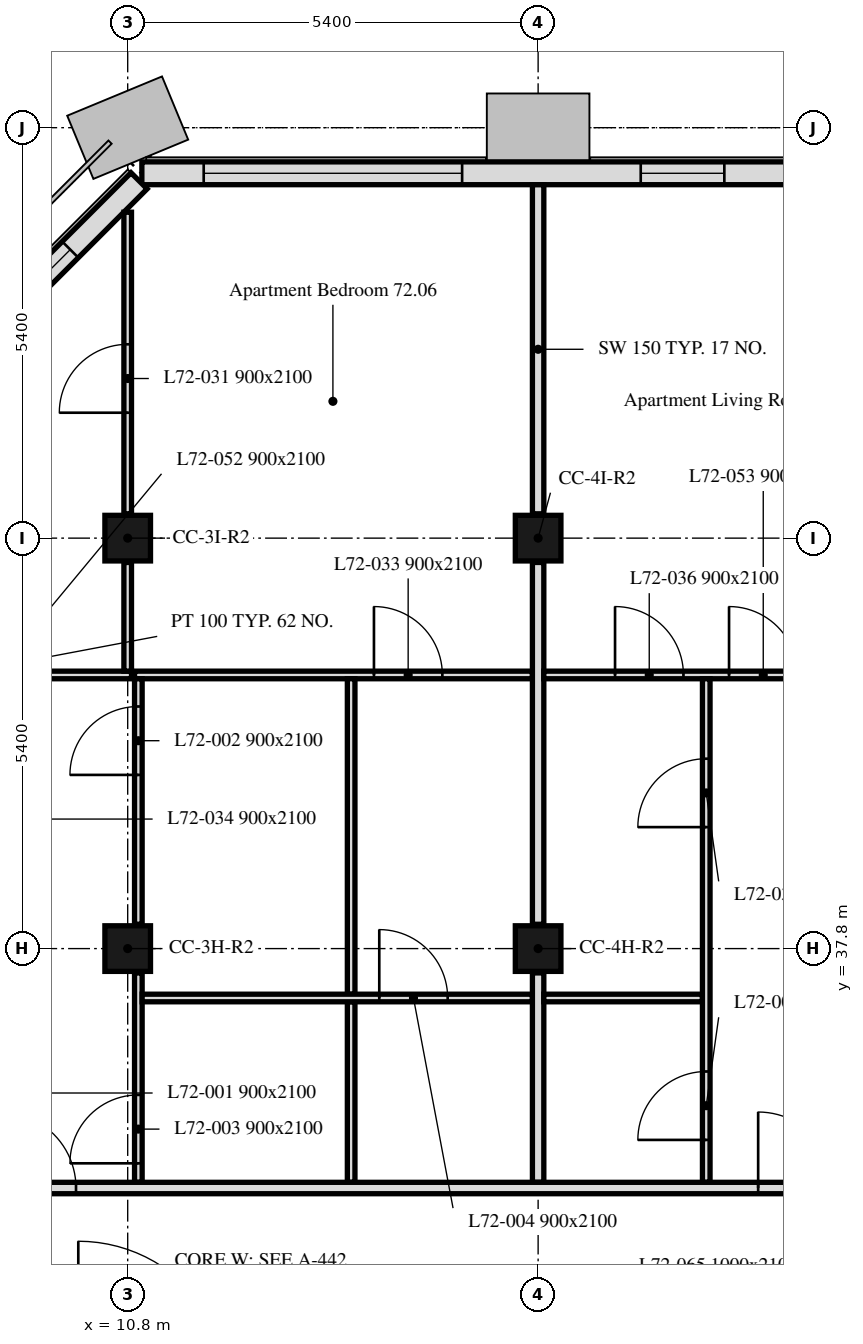
"""IFC4 building model, lengths in metres.
Left out: names, types, materials, properties, quantities, classifications, styles, units other than length and angle.
Written with IfcOpenShell. Run it as: python <this file> out.ifc"""

import sys

from ifc_helpers import new_model, si_unit, direction, frame, frame_2d, origin, origin_2d, place, context, subcontext, project, spatial, rectangle, extrude, element, fill, save


model = new_model("IFC4")
c1 = context("Model", 3, precision=1e-05, world=origin(), true_north=direction((0.0, 1.0)))
c2 = subcontext(c1, "Body", "Model", "MODEL_VIEW")
j1 = project(units=[si_unit("LENGTHUNIT", "METRE"), si_unit("PLANEANGLEUNIT", "RADIAN")], contexts=[c1])
p1 = place(None, origin())
s1 = spatial("IfcSite", under=j1, at=p1, CompositionType="ELEMENT")
p2 = place(p1, origin())
s2 = spatial("IfcBuilding", under=s1, at=p2, CompositionType="ELEMENT")
p3 = place(p2, frame((0.0, 0.0, 291.7)))
s3 = spatial("IfcBuildingStorey", under=s2, at=p3, CompositionType="ELEMENT", Elevation=291.7)
for number, where, z_axis, x_axis in (
    (1, (10.8, 37.8, 0.0), (0.0, 0.0, 1.0), (1.0, 0.0, 0.0)),
    (2, (16.2, 37.8, 0.0), (0.0, 0.0, 1.0), (1.0, 0.0, 0.0)),
    (3, (10.8, 43.2, 0.0), (0.0, 0.0, 1.0), (1.0, 0.0, 0.0)),
    (4, (16.2, 43.2, 0.0), (0.0, 0.0, 1.0), (1.0, 0.0, 0.0)),
):
    element("IfcColumn", number, at=place(p3, frame(where, z_axis=z_axis, x_axis=x_axis)), inside=s3, PredefinedType="COLUMN", context=c2, shape_type="SweptSolid", body=[
        extrude(rectangle(XDim=0.6, YDim=0.6, at=origin_2d()), origin(), (0.0, 0.0, 1.0), 3.0),
    ])
p4 = place(p3, frame((43.014, 48.0, 0.0), z_axis=(0.0, 0.0, 1.0), x_axis=(-1.0, 0.0, 0.0)))
e5 = element("IfcWall", 5, at=p4, inside=s3, PredefinedType="SOLIDWALL", context=c2, shape_type="SweptSolid", body=[
    extrude(rectangle(XDim=32.027, YDim=0.3, at=frame_2d((16.014, 0.0))), origin(), (0.0, 0.0, 1.0), 3.0),
])
p5 = place(p4, frame((2.764, 0.0, 0.9)))
e6 = element("IfcOpeningElement", 6, at=p5, cuts=e5, PredefinedType="OPENING", context=c2, shape_type="SweptSolid", body=[
    extrude(rectangle(XDim=1.1, YDim=1.7, at=frame_2d((0.55, 0.85))), frame((0.0, 0.16, 0.0), z_axis=(0.0, -1.0, 0.0), x_axis=(1.0, 0.0, 0.0)), (0.0, 0.0, 1.0), 0.32),
])
p6 = place(p4, frame((6.214, 0.0, 0.9)))
e7 = element("IfcOpeningElement", 7, at=p6, cuts=e5, PredefinedType="OPENING", context=c2, shape_type="SweptSolid", body=[
    extrude(rectangle(XDim=3.4, YDim=1.7, at=frame_2d((1.7, 0.85))), frame((0.0, 0.16, 0.0), z_axis=(0.0, -1.0, 0.0), x_axis=(1.0, 0.0, 0.0)), (0.0, 0.0, 1.0), 0.32),
])
p7 = place(p4, frame((13.564, 0.0, 0.9)))
e8 = element("IfcOpeningElement", 8, at=p7, cuts=e5, PredefinedType="OPENING", context=c2, shape_type="SweptSolid", body=[
    extrude(rectangle(XDim=1.1, YDim=1.7, at=frame_2d((0.55, 0.85))), frame((0.0, 0.16, 0.0), z_axis=(0.0, -1.0, 0.0), x_axis=(1.0, 0.0, 0.0)), (0.0, 0.0, 1.0), 0.32),
])
p8 = place(p4, frame((17.014, 0.0, 0.9)))
e9 = element("IfcOpeningElement", 9, at=p8, cuts=e5, PredefinedType="OPENING", context=c2, shape_type="SweptSolid", body=[
    extrude(rectangle(XDim=3.4, YDim=1.7, at=frame_2d((1.7, 0.85))), frame((0.0, 0.16, 0.0), z_axis=(0.0, -1.0, 0.0), x_axis=(1.0, 0.0, 0.0)), (0.0, 0.0, 1.0), 0.32),
])
p9 = place(p4, frame((24.364, 0.0, 0.9)))
e10 = element("IfcOpeningElement", 10, at=p9, cuts=e5, PredefinedType="OPENING", context=c2, shape_type="SweptSolid", body=[
    extrude(rectangle(XDim=1.1, YDim=1.7, at=frame_2d((0.55, 0.85))), frame((0.0, 0.16, 0.0), z_axis=(0.0, -1.0, 0.0), x_axis=(1.0, 0.0, 0.0)), (0.0, 0.0, 1.0), 0.32),
])
p10 = place(p4, frame((27.814, 0.0, 0.9)))
e11 = element("IfcOpeningElement", 11, at=p10, cuts=e5, PredefinedType="OPENING", context=c2, shape_type="SweptSolid", body=[
    extrude(rectangle(XDim=3.4, YDim=1.7, at=frame_2d((1.7, 0.85))), frame((0.0, 0.16, 0.0), z_axis=(0.0, -1.0, 0.0), x_axis=(1.0, 0.0, 0.0)), (0.0, 0.0, 1.0), 0.32),
])
p11 = place(p3, frame((10.949, 47.901, 0.0), z_axis=(0.0, 0.0, 1.0), x_axis=(-0.707106781187, -0.707106781187, 0.0)))
e12 = element("IfcWall", 12, at=p11, inside=s3, PredefinedType="SOLIDWALL", context=c2, shape_type="SweptSolid", body=[
    extrude(rectangle(XDim=6.86, YDim=0.3, at=frame_2d((3.43, 0.0))), origin(), (0.0, 0.0, 1.0), 3.0),
])
p12 = place(p11, frame((1.28, 0.0, 0.9)))
e13 = element("IfcOpeningElement", 13, at=p12, cuts=e12, PredefinedType="OPENING", context=c2, shape_type="SweptSolid", body=[
    extrude(rectangle(XDim=1.1, YDim=1.7, at=frame_2d((0.55, 0.85))), frame((0.0, 0.16, 0.0), z_axis=(0.0, -1.0, 0.0), x_axis=(1.0, 0.0, 0.0)), (0.0, 0.0, 1.0), 0.32),
])
p13 = place(p11, frame((4.48, 0.0, 0.9)))
e14 = element("IfcOpeningElement", 14, at=p13, cuts=e12, PredefinedType="OPENING", context=c2, shape_type="SweptSolid", body=[
    extrude(rectangle(XDim=1.1, YDim=1.7, at=frame_2d((0.55, 0.85))), frame((0.0, 0.16, 0.0), z_axis=(0.0, -1.0, 0.0), x_axis=(1.0, 0.0, 0.0)), (0.0, 0.0, 1.0), 0.32),
])
p14 = place(p3, frame((6.151, 41.4, 0.0), z_axis=(0.0, 0.0, 1.0), x_axis=(1.0, 0.0, 0.0)))
e15 = element("IfcWall", 15, at=p14, inside=s3, PredefinedType="PARTITIONING", context=c2, shape_type="SweptSolid", body=[
    extrude(rectangle(XDim=4.699, YDim=0.1, at=frame_2d((2.35, 0.0))), origin(), (0.0, 0.0, 1.0), 3.0),
])
p15 = place(p14, frame((1.079, 0.0, 0.0)))
e16 = element("IfcOpeningElement", 16, at=p15, cuts=e15, PredefinedType="OPENING", context=c2, shape_type="SweptSolid", body=[
    extrude(rectangle(XDim=0.9, YDim=2.1, at=frame_2d((0.45, 1.05))), frame((0.0, 0.05, 0.0), z_axis=(0.0, -1.0, 0.0), x_axis=(1.0, 0.0, 0.0)), (0.0, 0.0, 1.0), 0.1),
])
p16 = place(p14, frame((2.449, 0.0, 0.0)))
e17 = element("IfcOpeningElement", 17, at=p16, cuts=e15, PredefinedType="OPENING", context=c2, shape_type="SweptSolid", body=[
    extrude(rectangle(XDim=0.9, YDim=2.1, at=frame_2d((0.45, 1.05))), frame((0.0, 0.05, 0.0), z_axis=(0.0, -1.0, 0.0), x_axis=(1.0, 0.0, 0.0)), (0.0, 0.0, 1.0), 0.1),
])
p17 = place(p3, frame((10.8, 41.45, 0.0), z_axis=(0.0, 0.0, 1.0), x_axis=(0.0, 1.0, 0.0)))
e18 = element("IfcWall", 18, at=p17, inside=s3, PredefinedType="PARTITIONING", context=c2, shape_type="SweptSolid", body=[
    extrude(rectangle(XDim=1.43, YDim=0.1, at=frame_2d((0.715, 0.0))), origin(), (0.0, 0.0, 1.0), 3.0),
])
p18 = place(p3, frame((10.8, 43.52, 0.0), z_axis=(0.0, 0.0, 1.0), x_axis=(0.0, 1.0, 0.0)))
e19 = element("IfcWall", 19, at=p18, inside=s3, PredefinedType="PARTITIONING", context=c2, shape_type="SweptSolid", body=[
    extrude(rectangle(XDim=3.968, YDim=0.1, at=frame_2d((1.984, 0.0))), origin(), (0.0, 0.0, 1.0), 3.0),
])
p19 = place(p18, frame((1.33, 0.0, 0.0)))
e20 = element("IfcOpeningElement", 20, at=p19, cuts=e19, PredefinedType="OPENING", context=c2, shape_type="SweptSolid", body=[
    extrude(rectangle(XDim=0.9, YDim=2.1, at=frame_2d((0.45, 1.05))), frame((0.0, 0.05, 0.0), z_axis=(0.0, -1.0, 0.0), x_axis=(1.0, 0.0, 0.0)), (0.0, 0.0, 1.0), 0.1),
])
p20 = place(p3, frame((10.89, 41.4, 0.0), z_axis=(0.0, 0.0, 1.0), x_axis=(1.0, 0.0, 0.0)))
e21 = element("IfcWall", 21, at=p20, inside=s3, PredefinedType="PARTITIONING", context=c2, shape_type="SweptSolid", body=[
    extrude(rectangle(XDim=5.235, YDim=0.1, at=frame_2d((2.618, 0.0))), origin(), (0.0, 0.0, 1.0), 3.0),
])
p21 = place(p20, frame((3.15, 0.0, 0.0)))
e22 = element("IfcOpeningElement", 22, at=p21, cuts=e21, PredefinedType="OPENING", context=c2, shape_type="SweptSolid", body=[
    extrude(rectangle(XDim=0.9, YDim=2.1, at=frame_2d((0.45, 1.05))), frame((0.0, 0.05, 0.0), z_axis=(0.0, -1.0, 0.0), x_axis=(1.0, 0.0, 0.0)), (0.0, 0.0, 1.0), 0.1),
])
p22 = place(p3, frame((16.2, 43.52, 0.0), z_axis=(0.0, 0.0, 1.0), x_axis=(0.0, 1.0, 0.0)))
e23 = element("IfcWall", 23, at=p22, inside=s3, PredefinedType="PARTITIONING", context=c2, shape_type="SweptSolid", body=[
    extrude(rectangle(XDim=4.329, YDim=0.15, at=frame_2d((2.165, 0.0))), origin(), (0.0, 0.0, 1.0), 2.4),
])
p23 = place(p3, frame((10.94, 34.725, 0.0), z_axis=(0.0, 0.0, 1.0), x_axis=(0.0, 1.0, 0.0)))
e24 = element("IfcWall", 24, at=p23, inside=s3, PredefinedType="PARTITIONING", context=c2, shape_type="SweptSolid", body=[
    extrude(rectangle(XDim=2.755, YDim=0.1, at=frame_2d((1.377, 0.0))), origin(), (0.0, 0.0, 1.0), 3.0),
])
p24 = place(p23, frame((0.25, 0.0, 0.0)))
e25 = element("IfcOpeningElement", 25, at=p24, cuts=e24, PredefinedType="OPENING", context=c2, shape_type="SweptSolid", body=[
    extrude(rectangle(XDim=0.9, YDim=2.1, at=frame_2d((0.45, 1.05))), frame((0.0, 0.05, 0.0), z_axis=(0.0, -1.0, 0.0), x_axis=(1.0, 0.0, 0.0)), (0.0, 0.0, 1.0), 0.1),
])
p25 = place(p3, frame((10.94, 38.12, 0.0), z_axis=(0.0, 0.0, 1.0), x_axis=(0.0, 1.0, 0.0)))
e26 = element("IfcWall", 26, at=p25, inside=s3, PredefinedType="PARTITIONING", context=c2, shape_type="SweptSolid", body=[
    extrude(rectangle(XDim=3.23, YDim=0.1, at=frame_2d((1.615, 0.0))), origin(), (0.0, 0.0, 1.0), 3.0),
])
p26 = place(p25, frame((1.965, 0.0, 0.0)))
e27 = element("IfcOpeningElement", 27, at=p26, cuts=e26, PredefinedType="OPENING", context=c2, shape_type="SweptSolid", body=[
    extrude(rectangle(XDim=0.9, YDim=2.1, at=frame_2d((0.45, 1.05))), frame((0.0, 0.05, 0.0), z_axis=(0.0, -1.0, 0.0), x_axis=(1.0, 0.0, 0.0)), (0.0, 0.0, 1.0), 0.1),
])
p27 = place(p3, frame((13.74, 37.2, 0.0), z_axis=(0.0, 0.0, 1.0), x_axis=(0.0, 1.0, 0.0)))
e28 = element("IfcWall", 28, at=p27, inside=s3, PredefinedType="PARTITIONING", context=c2, shape_type="SweptSolid", body=[
    extrude(rectangle(XDim=4.15, YDim=0.1, at=frame_2d((2.075, 0.0))), origin(), (0.0, 0.0, 1.0), 3.0),
])
p28 = place(p3, frame((13.74, 34.725, 0.0), z_axis=(0.0, 0.0, 1.0), x_axis=(0.0, 1.0, 0.0)))
e29 = element("IfcWall", 29, at=p28, inside=s3, PredefinedType="PARTITIONING", context=c2, shape_type="SweptSolid", body=[
    extrude(rectangle(XDim=2.375, YDim=0.1, at=frame_2d((1.188, 0.0))), origin(), (0.0, 0.0, 1.0), 3.0),
])
p29 = place(p3, frame((10.99, 37.15, 0.0), z_axis=(0.0, 0.0, 1.0), x_axis=(1.0, 0.0, 0.0)))
e30 = element("IfcWall", 30, at=p29, inside=s3, PredefinedType="PARTITIONING", context=c2, shape_type="SweptSolid", body=[
    extrude(rectangle(XDim=5.135, YDim=0.1, at=frame_2d((2.567, 0.0))), origin(), (0.0, 0.0, 1.0), 3.0),
])
p30 = place(p29, frame((3.12, 0.0, 0.0)))
e31 = element("IfcOpeningElement", 31, at=p30, cuts=e30, PredefinedType="OPENING", context=c2, shape_type="SweptSolid", body=[
    extrude(rectangle(XDim=0.9, YDim=2.1, at=frame_2d((0.45, 1.05))), frame((0.0, 0.05, 0.0), z_axis=(0.0, -1.0, 0.0), x_axis=(1.0, 0.0, 0.0)), (0.0, 0.0, 1.0), 0.1),
])
p31 = place(p3, frame((16.2, 38.12, 0.0), z_axis=(0.0, 0.0, 1.0), x_axis=(0.0, 1.0, 0.0)))
e32 = element("IfcWall", 32, at=p31, inside=s3, PredefinedType="PARTITIONING", context=c2, shape_type="SweptSolid", body=[
    extrude(rectangle(XDim=4.76, YDim=0.15, at=frame_2d((2.38, 0.0))), origin(), (0.0, 0.0, 1.0), 2.4),
])
p32 = place(p3, frame((16.2, 34.725, 0.0), z_axis=(0.0, 0.0, 1.0), x_axis=(0.0, 1.0, 0.0)))
e33 = element("IfcWall", 33, at=p32, inside=s3, PredefinedType="PARTITIONING", context=c2, shape_type="SweptSolid", body=[
    extrude(rectangle(XDim=2.755, YDim=0.15, at=frame_2d((1.377, 0.0))), origin(), (0.0, 0.0, 1.0), 2.4),
])
p33 = place(p3, frame((16.275, 41.4, 0.0), z_axis=(0.0, 0.0, 1.0), x_axis=(1.0, 0.0, 0.0)))
e34 = element("IfcWall", 34, at=p33, inside=s3, PredefinedType="PARTITIONING", context=c2, shape_type="SweptSolid", body=[
    extrude(rectangle(XDim=10.65, YDim=0.1, at=frame_2d((5.325, 0.0))), origin(), (0.0, 0.0, 1.0), 2.4),
])
p34 = place(p33, frame((0.937, 0.0, 0.0)))
e35 = element("IfcOpeningElement", 35, at=p34, cuts=e34, PredefinedType="OPENING", context=c2, shape_type="SweptSolid", body=[
    extrude(rectangle(XDim=0.9, YDim=2.1, at=frame_2d((0.45, 1.05))), frame((0.0, 0.05, 0.0), z_axis=(0.0, -1.0, 0.0), x_axis=(1.0, 0.0, 0.0)), (0.0, 0.0, 1.0), 0.1),
])
p35 = place(p33, frame((8.075, 0.0, 0.0)))
e36 = element("IfcOpeningElement", 36, at=p35, cuts=e34, PredefinedType="OPENING", context=c2, shape_type="SweptSolid", body=[
    extrude(rectangle(XDim=0.9, YDim=2.1, at=frame_2d((0.45, 1.05))), frame((0.0, 0.05, 0.0), z_axis=(0.0, -1.0, 0.0), x_axis=(1.0, 0.0, 0.0)), (0.0, 0.0, 1.0), 0.1),
])
p36 = place(p33, frame((2.437, 0.0, 0.0)))
e37 = element("IfcOpeningElement", 37, at=p36, cuts=e34, PredefinedType="OPENING", context=c2, shape_type="SweptSolid", body=[
    extrude(rectangle(XDim=0.9, YDim=2.1, at=frame_2d((0.45, 1.05))), frame((0.0, 0.05, 0.0), z_axis=(0.0, -1.0, 0.0), x_axis=(1.0, 0.0, 0.0)), (0.0, 0.0, 1.0), 0.1),
])
p37 = place(p3, frame((16.275, 37.15, 0.0), z_axis=(0.0, 0.0, 1.0), x_axis=(1.0, 0.0, 0.0)))
e38 = element("IfcWall", 38, at=p37, inside=s3, PredefinedType="PARTITIONING", context=c2, shape_type="SweptSolid", body=[
    extrude(rectangle(XDim=2.087, YDim=0.1, at=frame_2d((1.043, 0.0))), origin(), (0.0, 0.0, 1.0), 3.0),
])
p38 = place(p3, frame((18.412, 34.725, 0.0), z_axis=(0.0, 0.0, 1.0), x_axis=(0.0, 1.0, 0.0)))
e39 = element("IfcWall", 39, at=p38, inside=s3, PredefinedType="PARTITIONING", context=c2, shape_type="SweptSolid", body=[
    extrude(rectangle(XDim=6.625, YDim=0.1, at=frame_2d((3.312, 0.0))), origin(), (0.0, 0.0, 1.0), 3.0),
])
p39 = place(p38, frame((0.558, 0.0, 0.0)))
e40 = element("IfcOpeningElement", 40, at=p39, cuts=e39, PredefinedType="OPENING", context=c2, shape_type="SweptSolid", body=[
    extrude(rectangle(XDim=0.9, YDim=2.1, at=frame_2d((0.45, 1.05))), frame((0.0, 0.05, 0.0), z_axis=(0.0, -1.0, 0.0), x_axis=(1.0, 0.0, 0.0)), (0.0, 0.0, 1.0), 0.1),
])
p40 = place(p38, frame((4.673, 0.0, 0.0)))
e41 = element("IfcOpeningElement", 41, at=p40, cuts=e39, PredefinedType="OPENING", context=c2, shape_type="SweptSolid", body=[
    extrude(rectangle(XDim=0.9, YDim=2.1, at=frame_2d((0.45, 1.05))), frame((0.0, 0.05, 0.0), z_axis=(0.0, -1.0, 0.0), x_axis=(1.0, 0.0, 0.0)), (0.0, 0.0, 1.0), 0.1),
])
p41 = place(p3, frame((6.151, 34.65, 0.0), z_axis=(0.0, 0.0, 1.0), x_axis=(1.0, 0.0, 0.0)))
e42 = element("IfcWall", 42, at=p41, inside=s3, PredefinedType="PARTITIONING", context=c2, shape_type="SweptSolid", body=[
    extrude(rectangle(XDim=41.698, YDim=0.15, at=frame_2d((20.849, 0.0))), origin(), (0.0, 0.0, 1.0), 2.4),
])
p42 = place(p41, frame((2.969, 0.0, 0.0)))
e43 = element("IfcOpeningElement", 43, at=p42, cuts=e42, PredefinedType="OPENING", context=c2, shape_type="SweptSolid", body=[
    extrude(rectangle(XDim=1.0, YDim=2.1, at=frame_2d((0.5, 1.05))), frame((0.0, 0.075, 0.0), z_axis=(0.0, -1.0, 0.0), x_axis=(1.0, 0.0, 0.0)), (0.0, 0.0, 1.0), 0.15),
])
p43 = place(p41, frame((12.944, 0.0, 0.0)))
e44 = element("IfcOpeningElement", 44, at=p43, cuts=e42, PredefinedType="OPENING", context=c2, shape_type="SweptSolid", body=[
    extrude(rectangle(XDim=1.0, YDim=2.1, at=frame_2d((0.5, 1.05))), frame((0.0, 0.075, 0.0), z_axis=(0.0, -1.0, 0.0), x_axis=(1.0, 0.0, 0.0)), (0.0, 0.0, 1.0), 0.15),
])
p44 = place(p41, frame((24.444, 0.0, 0.0)))
e45 = element("IfcOpeningElement", 45, at=p44, cuts=e42, PredefinedType="OPENING", context=c2, shape_type="SweptSolid", body=[
    extrude(rectangle(XDim=1.0, YDim=2.1, at=frame_2d((0.5, 1.05))), frame((0.0, 0.075, 0.0), z_axis=(0.0, -1.0, 0.0), x_axis=(1.0, 0.0, 0.0)), (0.0, 0.0, 1.0), 0.15),
])
p45 = place(p41, frame((34.964, 0.0, 0.0)))
e46 = element("IfcOpeningElement", 46, at=p45, cuts=e42, PredefinedType="OPENING", context=c2, shape_type="SweptSolid", body=[
    extrude(rectangle(XDim=1.0, YDim=2.1, at=frame_2d((0.5, 1.05))), frame((0.0, 0.075, 0.0), z_axis=(0.0, -1.0, 0.0), x_axis=(1.0, 0.0, 0.0)), (0.0, 0.0, 1.0), 0.15),
])
p46 = place(p9, origin())
e47 = element("IfcWindow", 47, at=p46, inside=s3, PartitioningType="SINGLE_PANEL", PredefinedType="WINDOW", context=c2, shape_type="SweptSolid", body=[
    extrude(rectangle(XDim=1.1, YDim=1.7, at=frame_2d((0.55, 0.85))), frame((0.0, 0.03, 0.0), z_axis=(0.0, -1.0, 0.0), x_axis=(1.0, 0.0, 0.0)), (0.0, 0.0, 1.0), 0.06),
])
fill(e10, e47)
p47 = place(p10, origin())
e48 = element("IfcWindow", 48, at=p47, inside=s3, PartitioningType="SINGLE_PANEL", PredefinedType="WINDOW", context=c2, shape_type="SweptSolid", body=[
    extrude(rectangle(XDim=3.4, YDim=1.7, at=frame_2d((1.7, 0.85))), frame((0.0, 0.03, 0.0), z_axis=(0.0, -1.0, 0.0), x_axis=(1.0, 0.0, 0.0)), (0.0, 0.0, 1.0), 0.06),
])
fill(e11, e48)
p48 = place(p12, origin())
e49 = element("IfcWindow", 49, at=p48, inside=s3, PartitioningType="SINGLE_PANEL", PredefinedType="WINDOW", context=c2, shape_type="SweptSolid", body=[
    extrude(rectangle(XDim=1.1, YDim=1.7, at=frame_2d((0.55, 0.85))), frame((0.0, 0.03, 0.0), z_axis=(0.0, -1.0, 0.0), x_axis=(1.0, 0.0, 0.0)), (0.0, 0.0, 1.0), 0.06),
])
fill(e13, e49)
p49 = place(p26, origin())
e50 = element("IfcDoor", 50, at=p49, inside=s3, OperationType="SINGLE_SWING_RIGHT", PredefinedType="DOOR", context=c2, shape_type="SweptSolid", body=[
    extrude(rectangle(XDim=0.9, YDim=2.1, at=frame_2d((0.45, 1.05))), frame((0.0, 0.025, 0.0), z_axis=(0.0, -1.0, 0.0), x_axis=(1.0, 0.0, 0.0)), (0.0, 0.0, 1.0), 0.05),
])
fill(e27, e50)
p50 = place(p24, origin())
e51 = element("IfcDoor", 51, at=p50, inside=s3, OperationType="SINGLE_SWING_RIGHT", PredefinedType="DOOR", context=c2, shape_type="SweptSolid", body=[
    extrude(rectangle(XDim=0.9, YDim=2.1, at=frame_2d((0.45, 1.05))), frame((0.0, 0.025, 0.0), z_axis=(0.0, -1.0, 0.0), x_axis=(1.0, 0.0, 0.0)), (0.0, 0.0, 1.0), 0.05),
])
fill(e25, e51)
p51 = place(p30, origin())
e52 = element("IfcDoor", 52, at=p51, inside=s3, OperationType="SINGLE_SWING_RIGHT", PredefinedType="DOOR", context=c2, shape_type="SweptSolid", body=[
    extrude(rectangle(XDim=0.9, YDim=2.1, at=frame_2d((0.45, 1.05))), frame((0.0, 0.025, 0.0), z_axis=(0.0, -1.0, 0.0), x_axis=(1.0, 0.0, 0.0)), (0.0, 0.0, 1.0), 0.05),
])
fill(e31, e52)
p52 = place(p39, origin())
e53 = element("IfcDoor", 53, at=p52, inside=s3, OperationType="SINGLE_SWING_RIGHT", PredefinedType="DOOR", context=c2, shape_type="SweptSolid", body=[
    extrude(rectangle(XDim=0.9, YDim=2.1, at=frame_2d((0.45, 1.05))), frame((0.0, 0.025, 0.0), z_axis=(0.0, -1.0, 0.0), x_axis=(1.0, 0.0, 0.0)), (0.0, 0.0, 1.0), 0.05),
])
fill(e40, e53)
p53 = place(p19, origin())
e54 = element("IfcDoor", 54, at=p53, inside=s3, OperationType="SINGLE_SWING_LEFT", PredefinedType="DOOR", context=c2, shape_type="SweptSolid", body=[
    extrude(rectangle(XDim=0.9, YDim=2.1, at=frame_2d((0.45, 1.05))), frame((0.0, 0.025, 0.0), z_axis=(0.0, -1.0, 0.0), x_axis=(1.0, 0.0, 0.0)), (0.0, 0.0, 1.0), 0.05),
])
fill(e20, e54)
p54 = place(p21, origin())
e55 = element("IfcDoor", 55, at=p54, inside=s3, OperationType="SINGLE_SWING_RIGHT", PredefinedType="DOOR", context=c2, shape_type="SweptSolid", body=[
    extrude(rectangle(XDim=0.9, YDim=2.1, at=frame_2d((0.45, 1.05))), frame((0.0, 0.025, 0.0), z_axis=(0.0, -1.0, 0.0), x_axis=(1.0, 0.0, 0.0)), (0.0, 0.0, 1.0), 0.05),
])
fill(e22, e55)
p55 = place(p34, origin())
e56 = element("IfcDoor", 56, at=p55, inside=s3, OperationType="SINGLE_SWING_LEFT", PredefinedType="DOOR", context=c2, shape_type="SweptSolid", body=[
    extrude(rectangle(XDim=0.9, YDim=2.1, at=frame_2d((0.45, 1.05))), frame((0.0, 0.025, 0.0), z_axis=(0.0, -1.0, 0.0), x_axis=(1.0, 0.0, 0.0)), (0.0, 0.0, 1.0), 0.05),
])
fill(e35, e56)
p56 = place(p40, origin())
e57 = element("IfcDoor", 57, at=p56, inside=s3, OperationType="SINGLE_SWING_LEFT", PredefinedType="DOOR", context=c2, shape_type="SweptSolid", body=[
    extrude(rectangle(XDim=0.9, YDim=2.1, at=frame_2d((0.45, 1.05))), frame((0.0, 0.025, 0.0), z_axis=(0.0, -1.0, 0.0), x_axis=(1.0, 0.0, 0.0)), (0.0, 0.0, 1.0), 0.05),
])
fill(e41, e57)
p57 = place(p36, origin())
e58 = element("IfcDoor", 58, at=p57, inside=s3, OperationType="SINGLE_SWING_RIGHT", PredefinedType="DOOR", context=c2, shape_type="SweptSolid", body=[
    extrude(rectangle(XDim=0.9, YDim=2.1, at=frame_2d((0.45, 1.05))), frame((0.0, 0.025, 0.0), z_axis=(0.0, -1.0, 0.0), x_axis=(1.0, 0.0, 0.0)), (0.0, 0.0, 1.0), 0.05),
])
fill(e37, e58)
p58 = place(p42, origin())
e59 = element("IfcDoor", 59, at=p58, inside=s3, OperationType="SINGLE_SWING_RIGHT", PredefinedType="DOOR", context=c2, shape_type="SweptSolid", body=[
    extrude(rectangle(XDim=1.0, YDim=2.1, at=frame_2d((0.5, 1.05))), frame((0.0, 0.025, 0.0), z_axis=(0.0, -1.0, 0.0), x_axis=(1.0, 0.0, 0.0)), (0.0, 0.0, 1.0), 0.05),
])
fill(e43, e59)
p59 = place(p43, origin())
e60 = element("IfcDoor", 60, at=p59, inside=s3, OperationType="SINGLE_SWING_RIGHT", PredefinedType="DOOR", context=c2, shape_type="SweptSolid", body=[
    extrude(rectangle(XDim=1.0, YDim=2.1, at=frame_2d((0.5, 1.05))), frame((0.0, 0.025, 0.0), z_axis=(0.0, -1.0, 0.0), x_axis=(1.0, 0.0, 0.0)), (0.0, 0.0, 1.0), 0.05),
])
fill(e44, e60)
save(model, sys.argv[1])
